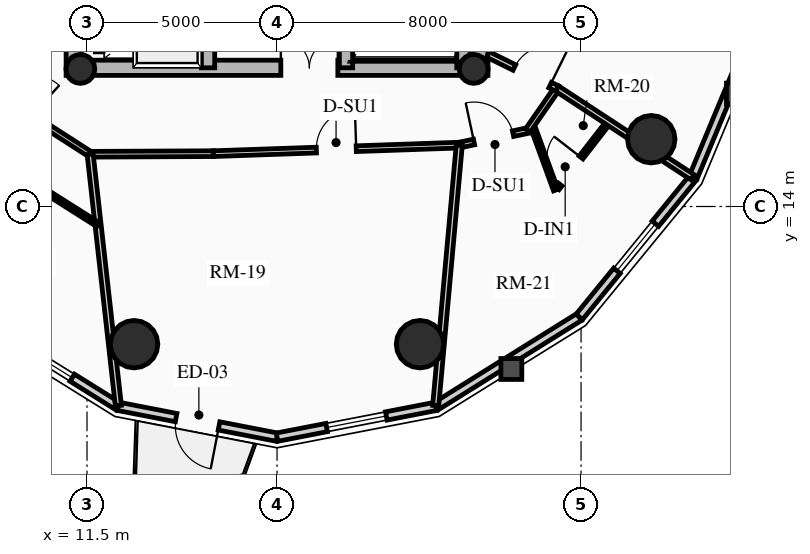
"""IFC4 building model, lengths in metres.
Left out: names, types, materials, properties, quantities, classifications, styles, units other than length and angle.
Written with IfcOpenShell. Run it as: python <this file> out.ifc"""

import sys

from ifc_helpers import new_model, si_unit, direction, frame, frame_2d, origin, origin_2d, place, context, subcontext, project, spatial, rectangle, circle, hollow_circle, extrude, source, transform, mapped, element, fill, save


model = new_model("IFC4")
c1 = context("Model", 3, precision=1e-05, world=origin(), true_north=direction((0.0, 1.0)))
c2 = subcontext(c1, "Body", "Model", "MODEL_VIEW")
j1 = project(units=[si_unit("LENGTHUNIT", "METRE"), si_unit("PLANEANGLEUNIT", "RADIAN")], contexts=[c1])
p1 = place(None, origin())
s1 = spatial("IfcSite", under=j1, at=p1, CompositionType="ELEMENT")
p2 = place(p1, origin())
s2 = spatial("IfcBuilding", under=s1, at=p2, CompositionType="ELEMENT")
p3 = place(p2, frame((0.0, 0.0, 171.97)))
s3 = spatial("IfcBuildingStorey", under=s2, at=p3, CompositionType="ELEMENT", Elevation=171.97)
for number, where, z_axis, x_axis in (
    (1, (11.15, 17.45, 0.0), (0.0, 0.0, 1.0), (0.0, 1.0, 0.0)),
    (2, (21.85, 17.45, 0.0), (0.0, 0.0, 1.0), (0.0, 1.0, 0.0)),
):
    element("IfcWall", number, at=place(p3, frame(where, z_axis=z_axis, x_axis=x_axis)), inside=s3, PredefinedType="SHEAR", context=c2, shape_type="SweptSolid", body=[
        extrude(rectangle(XDim=14.1, YDim=0.4, at=frame_2d((7.05, 0.0))), origin(), (0.0, 0.0, 1.0), 2.91),
    ])
p4 = place(p3, frame((11.15, 17.65, 0.0), z_axis=(0.0, 0.0, 1.0), x_axis=(1.0, 0.0, 0.0)))
e3 = element("IfcWall", 3, at=p4, inside=s3, PredefinedType="SHEAR", context=c2, shape_type="SweptSolid", body=[
    extrude(rectangle(XDim=10.7, YDim=0.4, at=frame_2d((5.35, 0.0))), origin(), (0.0, 0.0, 1.0), 2.91),
])
m1 = source(origin(), c2, "Body", "SweptSolid", [
    extrude(rectangle(XDim=1.5, YDim=2.02, at=frame_2d((0.75, 1.01))), frame((0.0, 0.21, 0.0), z_axis=(0.0, -1.0, 0.0), x_axis=(1.0, 0.0, 0.0)), (0.0, 0.0, 1.0), 0.42),
])
p5 = place(p4, frame((5.45, 0.0, 0.0)))
e4 = element("IfcOpeningElement", 4, at=p5, cuts=e3, PredefinedType="OPENING", context=c2, shape_type="MappedRepresentation", body=[
    mapped(m1, transform((0.0, 0.0, 0.0), x_axis=(1.0, 0.0, 0.0), y_axis=(0.0, 1.0, 0.0), z_axis=(0.0, 0.0, 1.0), scale=1.0)),
])
p6 = place(p3, frame((14.685, 17.65, 0.0), z_axis=(0.0, 0.0, 1.0), x_axis=(0.0, 1.0, 0.0)))
e5 = element("IfcWall", 5, at=p6, inside=s3, PredefinedType="SHEAR", context=c2, shape_type="SweptSolid", body=[
    extrude(rectangle(XDim=13.7, YDim=0.35, at=frame_2d((6.85, 0.0))), origin(), (0.0, 0.0, 1.0), 2.91),
])
m2 = source(origin(), c2, "Body", "SweptSolid", [
    extrude(rectangle(XDim=1.1, YDim=2.015, at=frame_2d((0.55, 1.007))), frame((0.0, 0.185, 0.0), z_axis=(0.0, -1.0, 0.0), x_axis=(1.0, 0.0, 0.0)), (0.0, 0.0, 1.0), 0.37),
])
p7 = place(p6, frame((4.85, 0.0, 0.0)))
e6 = element("IfcOpeningElement", 6, at=p7, cuts=e5, PredefinedType="OPENING", context=c2, shape_type="MappedRepresentation", body=[
    mapped(m2, transform((0.0, 0.0, 0.0), x_axis=(1.0, 0.0, 0.0), y_axis=(0.0, 1.0, 0.0), z_axis=(0.0, 0.0, 1.0), scale=1.0)),
])
p8 = place(p6, frame((0.625, 0.0, 0.0)))
e7 = element("IfcOpeningElement", 7, at=p8, cuts=e5, PredefinedType="OPENING", context=c2, shape_type="MappedRepresentation", body=[
    mapped(m2, transform((0.0, 0.0, 0.0), x_axis=(1.0, 0.0, 0.0), y_axis=(0.0, 1.0, 0.0), z_axis=(0.0, 0.0, 1.0), scale=1.0)),
])
p9 = place(p6, frame((2.625, 0.0, 0.0)))
e8 = element("IfcOpeningElement", 8, at=p9, cuts=e5, PredefinedType="OPENING", context=c2, shape_type="MappedRepresentation", body=[
    mapped(m2, transform((0.0, 0.0, 0.0), x_axis=(1.0, 0.0, 0.0), y_axis=(0.0, 1.0, 0.0), z_axis=(0.0, 0.0, 1.0), scale=1.0)),
])
m3 = source(origin(), c2, "Body", "SweptSolid", [
    extrude(rectangle(XDim=1.15, YDim=2.02, at=frame_2d((0.575, 1.01))), frame((0.0, 0.185, 0.0), z_axis=(0.0, -1.0, 0.0), x_axis=(1.0, 0.0, 0.0)), (0.0, 0.0, 1.0), 0.37),
])
p10 = place(p6, frame((7.27, 0.0, 0.0)))
e9 = element("IfcOpeningElement", 9, at=p10, cuts=e5, PredefinedType="OPENING", context=c2, shape_type="MappedRepresentation", body=[
    mapped(m3, transform((0.0, 0.0, 0.0), x_axis=(1.0, 0.0, 0.0), y_axis=(0.0, 1.0, 0.0), z_axis=(0.0, 0.0, 1.0), scale=1.0)),
])
p11 = place(p3, frame((18.315, 17.65, 0.0), z_axis=(0.0, 0.0, 1.0), x_axis=(0.0, 1.0, 0.0)))
e10 = element("IfcWall", 10, at=p11, inside=s3, PredefinedType="SHEAR", context=c2, shape_type="SweptSolid", body=[
    extrude(rectangle(XDim=9.6, YDim=0.35, at=frame_2d((4.8, 0.0))), origin(), (0.0, 0.0, 1.0), 2.91),
])
p12 = place(p11, frame((5.28, 0.0, 0.0)))
e11 = element("IfcOpeningElement", 11, at=p12, cuts=e10, PredefinedType="OPENING", context=c2, shape_type="MappedRepresentation", body=[
    mapped(m3, transform((0.0, 0.0, 0.0), x_axis=(1.0, 0.0, 0.0), y_axis=(0.0, 1.0, 0.0), z_axis=(0.0, 0.0, 1.0), scale=1.0)),
])
p13 = place(p3, frame((21.405, 17.65, 0.0), z_axis=(0.0, 0.0, 1.0), x_axis=(0.0, 1.0, 0.0)))
e12 = element("IfcWall", 12, at=p13, inside=s3, PredefinedType="SHEAR", context=c2, shape_type="SweptSolid", body=[
    extrude(rectangle(XDim=6.695, YDim=0.35, at=frame_2d((3.348, 0.0))), origin(), (0.0, 0.0, 1.0), 2.91),
])
for number, where, z_axis, x_axis in (
    (13, (11.325, 17.62, 0.0), (0.0, 0.0, 1.0), (1.0, 0.0, 0.0)),
    (14, (21.675, 17.62, 0.0), (0.0, 0.0, 1.0), (1.0, 0.0, 0.0)),
):
    element("IfcColumn", number, at=place(p3, frame(where, z_axis=z_axis, x_axis=x_axis)), inside=s3, PredefinedType="COLUMN", context=c2, shape_type="SweptSolid", body=[
        extrude(hollow_circle(Radius=0.38, WallThickness=0.032, at=origin_2d()), origin(), (0.0, 0.0, 1.0), 2.91),
    ])
for number, where, z_axis, x_axis in (
    (15, (12.739, 10.377, 0.0), (0.0, 0.0, 1.0), (1.0, 0.0, 0.0)),
    (16, (20.261, 10.377, 0.0), (0.0, 0.0, 1.0), (1.0, 0.0, 0.0)),
    (17, (26.347, 15.771, 0.0), (0.0, 0.0, 1.0), (1.0, 0.0, 0.0)),
):
    element("IfcColumn", number, at=place(p3, frame(where, z_axis=z_axis, x_axis=x_axis)), inside=s3, PredefinedType="USERDEFINED", context=c2, shape_type="SweptSolid", body=[
        extrude(circle(Radius=0.625, at=origin_2d()), origin(), (0.0, 0.0, 1.0), 2.91),
    ])
p14 = place(p3, frame((12.319, 8.741, 0.0), z_axis=(0.0, 0.0, 1.0), x_axis=(-0.848399108042, 0.529357113368, 0.0)))
e18 = element("IfcWall", 18, at=p14, inside=s3, PredefinedType="SOLIDWALL", context=c2, shape_type="SweptSolid", body=[
    extrude(rectangle(XDim=4.446, YDim=0.22, at=frame_2d((2.223, 0.0))), origin(), (0.0, 0.0, 1.0), 2.245),
])
m4 = source(origin(), c2, "Body", "SweptSolid", [
    extrude(rectangle(XDim=1.6, YDim=1.3, at=frame_2d((0.8, 0.65))), frame((0.0, 0.12, 0.0), z_axis=(0.0, -1.0, 0.0), x_axis=(1.0, 0.0, 0.0)), (0.0, 0.0, 1.0), 0.24),
])
p15 = place(p14, frame((1.423, 0.0, 0.65)))
e19 = element("IfcOpeningElement", 19, at=p15, cuts=e18, PredefinedType="OPENING", context=c2, shape_type="MappedRepresentation", body=[
    mapped(m4, transform((0.0, 0.0, 0.0), x_axis=(1.0, 0.0, 0.0), y_axis=(0.0, 1.0, 0.0), z_axis=(0.0, 0.0, 1.0), scale=1.0)),
])
p16 = place(p3, frame((16.5, 7.93, 0.0), z_axis=(0.0, 0.0, 1.0), x_axis=(-0.981703883443, 0.190413983815, 0.0)))
e20 = element("IfcWall", 20, at=p16, inside=s3, PredefinedType="SOLIDWALL", context=c2, shape_type="SweptSolid", body=[
    extrude(rectangle(XDim=4.259, YDim=0.22, at=frame_2d((2.13, 0.0))), origin(), (0.0, 0.0, 1.0), 2.245),
])
m5 = source(origin(), c2, "Body", "SweptSolid", [
    extrude(rectangle(XDim=1.15, YDim=2.005, at=frame_2d((0.575, 1.002))), frame((0.0, 0.12, 0.0), z_axis=(0.0, -1.0, 0.0), x_axis=(1.0, 0.0, 0.0)), (0.0, 0.0, 1.0), 0.24),
])
p17 = place(p16, frame((1.555, 0.0, 0.0)))
e21 = element("IfcOpeningElement", 21, at=p17, cuts=e20, PredefinedType="OPENING", context=c2, shape_type="MappedRepresentation", body=[
    mapped(m5, transform((0.0, 0.0, 0.0), x_axis=(1.0, 0.0, 0.0), y_axis=(0.0, 1.0, 0.0), z_axis=(0.0, 0.0, 1.0), scale=1.0)),
])
p18 = place(p3, frame((20.681, 8.741, 0.0), z_axis=(0.0, 0.0, 1.0), x_axis=(-0.981703883443, -0.190413983815, 0.0)))
e22 = element("IfcWall", 22, at=p18, inside=s3, PredefinedType="SOLIDWALL", context=c2, shape_type="SweptSolid", body=[
    extrude(rectangle(XDim=4.259, YDim=0.22, at=frame_2d((2.13, 0.0))), origin(), (0.0, 0.0, 1.0), 2.245),
])
p19 = place(p18, frame((1.33, 0.0, 0.65)))
e23 = element("IfcOpeningElement", 23, at=p19, cuts=e22, PredefinedType="OPENING", context=c2, shape_type="MappedRepresentation", body=[
    mapped(m4, transform((0.0, 0.0, 0.0), x_axis=(1.0, 0.0, 0.0), y_axis=(0.0, 1.0, 0.0), z_axis=(0.0, 0.0, 1.0), scale=1.0)),
])
p20 = place(p3, frame((24.453, 11.094, 0.0), z_axis=(0.0, 0.0, 1.0), x_axis=(-0.848399108042, -0.529357113368, 0.0)))
e24 = element("IfcWall", 24, at=p20, inside=s3, PredefinedType="SOLIDWALL", context=c2, shape_type="SweptSolid", body=[
    extrude(rectangle(XDim=4.446, YDim=0.22, at=frame_2d((2.223, 0.0))), origin(), (0.0, 0.0, 1.0), 2.245),
])
p21 = place(p3, frame((27.447, 14.76, 0.0), z_axis=(0.0, 0.0, 1.0), x_axis=(-0.632470615287, -0.774584353572, 0.0)))
e25 = element("IfcWall", 25, at=p21, inside=s3, PredefinedType="SOLIDWALL", context=c2, shape_type="SweptSolid", body=[
    extrude(rectangle(XDim=4.733, YDim=0.22, at=frame_2d((2.366, 0.0))), origin(), (0.0, 0.0, 1.0), 2.245),
])
p22 = place(p21, frame((1.566, 0.0, 0.65)))
e26 = element("IfcOpeningElement", 26, at=p22, cuts=e25, PredefinedType="OPENING", context=c2, shape_type="MappedRepresentation", body=[
    mapped(m4, transform((0.0, 0.0, 0.0), x_axis=(1.0, 0.0, 0.0), y_axis=(0.0, 1.0, 0.0), z_axis=(0.0, 0.0, 1.0), scale=1.0)),
])
p23 = place(p3, frame((29.369, 19.38, 0.0), z_axis=(0.0, 0.0, 1.0), x_axis=(-0.384144094086, -0.923273152961, 0.0)))
e27 = element("IfcWall", 27, at=p23, inside=s3, PredefinedType="SOLIDWALL", context=c2, shape_type="SweptSolid", body=[
    extrude(rectangle(XDim=5.003, YDim=0.22, at=frame_2d((2.501, 0.0))), origin(), (0.0, 0.0, 1.0), 2.245),
])
p24 = place(p3, frame((10.277, 16.214, 0.0), z_axis=(0.0, 0.0, 1.0), x_axis=(0.841060909507, -0.540940427865, 0.0)))
e28 = element("IfcWall", 28, at=p24, inside=s3, PredefinedType="PARTITIONING", context=c2, shape_type="SweptSolid", body=[
    extrude(rectangle(XDim=1.552, YDim=0.15, at=frame_2d((0.776, 0.0))), origin(), (0.0, 0.0, 1.0), 2.245),
])
p25 = place(p3, frame((11.583, 15.375, 0.0), z_axis=(0.0, 0.0, 1.0), x_axis=(0.999988014548, 0.004895994347, 0.0)))
e29 = element("IfcWall", 29, at=p25, inside=s3, PredefinedType="PARTITIONING", context=c2, shape_type="SweptSolid", body=[
    extrude(rectangle(XDim=3.241, YDim=0.15, at=frame_2d((1.621, 0.0))), origin(), (0.0, 0.0, 1.0), 2.245),
])
p26 = place(p3, frame((14.824, 15.391, 0.0), z_axis=(0.0, 0.0, 1.0), x_axis=(0.999399579064, 0.034647963376, 0.0)))
e30 = element("IfcWall", 30, at=p26, inside=s3, PredefinedType="PARTITIONING", context=c2, shape_type="SweptSolid", body=[
    extrude(rectangle(XDim=6.476, YDim=0.15, at=frame_2d((3.238, 0.0))), origin(), (0.0, 0.0, 1.0), 2.245),
])
m6 = source(origin(), c2, "Body", "SweptSolid", [
    extrude(rectangle(XDim=1.05, YDim=2.015, at=frame_2d((0.525, 1.007))), frame((0.0, 0.085, 0.0), z_axis=(0.0, -1.0, 0.0), x_axis=(1.0, 0.0, 0.0)), (0.0, 0.0, 1.0), 0.17),
])
p27 = place(p26, frame((2.713, 0.0, 0.0)))
e31 = element("IfcOpeningElement", 31, at=p27, cuts=e30, PredefinedType="OPENING", context=c2, shape_type="MappedRepresentation", body=[
    mapped(m6, transform((0.0, 0.0, 0.0), x_axis=(1.0, 0.0, 0.0), y_axis=(0.0, 1.0, 0.0), z_axis=(0.0, 0.0, 1.0), scale=1.0)),
])
p28 = place(p3, frame((21.295, 15.615, 0.0), z_axis=(0.0, 0.0, 1.0), x_axis=(0.978043957244, 0.20839869889, 0.0)))
e32 = element("IfcWall", 32, at=p28, inside=s3, PredefinedType="PARTITIONING", context=c2, shape_type="SweptSolid", body=[
    extrude(rectangle(XDim=1.844, YDim=0.15, at=frame_2d((0.922, 0.0))), origin(), (0.0, 0.0, 1.0), 2.245),
])
p29 = place(p28, frame((0.397, 0.0, 0.0)))
e33 = element("IfcOpeningElement", 33, at=p29, cuts=e32, PredefinedType="OPENING", context=c2, shape_type="MappedRepresentation", body=[
    mapped(m6, transform((0.0, 0.0, 0.0), x_axis=(1.0, 0.0, 0.0), y_axis=(0.0, 1.0, 0.0), z_axis=(0.0, 0.0, 1.0), scale=1.0)),
])
p30 = place(p3, frame((23.099, 15.999, 0.0), z_axis=(0.0, 0.0, 1.0), x_axis=(0.570001625459, 0.821643564433, 0.0)))
e34 = element("IfcWall", 34, at=p30, inside=s3, PredefinedType="PARTITIONING", context=c2, shape_type="SweptSolid", body=[
    extrude(rectangle(XDim=1.347, YDim=0.15, at=frame_2d((0.673, 0.0))), origin(), (0.0, 0.0, 1.0), 2.245),
])
p31 = place(p3, frame((11.583, 15.375, 0.0), z_axis=(0.0, 0.0, 1.0), x_axis=(0.111538514066, -0.993760111838, 0.0)))
e35 = element("IfcWall", 35, at=p31, inside=s3, PredefinedType="PARTITIONING", context=c2, shape_type="SweptSolid", body=[
    extrude(rectangle(XDim=6.656, YDim=0.16, at=frame_2d((3.328, 0.0))), origin(), (0.0, 0.0, 1.0), 2.245),
])
p32 = place(p3, frame((21.295, 15.615, 0.0), z_axis=(0.0, 0.0, 1.0), x_axis=(-0.090129576558, -0.995930047458, 0.0)))
e36 = element("IfcWall", 36, at=p32, inside=s3, PredefinedType="PARTITIONING", context=c2, shape_type="SweptSolid", body=[
    extrude(rectangle(XDim=6.883, YDim=0.16, at=frame_2d((3.441, 0.0))), origin(), (0.0, 0.0, 1.0), 2.245),
])
p33 = place(p3, frame((23.866, 17.106, 0.0), z_axis=(0.0, 0.0, 1.0), x_axis=(0.836641352238, -0.547751081902, 0.0)))
e37 = element("IfcWall", 37, at=p33, inside=s3, PredefinedType="PARTITIONING", context=c2, shape_type="SweptSolid", body=[
    extrude(rectangle(XDim=4.26, YDim=0.16, at=frame_2d((2.13, 0.0))), origin(), (0.0, 0.0, 1.0), 2.245),
])
p34 = place(p3, frame((22.05, 18.0, 0.0), z_axis=(0.0, 0.0, 1.0), x_axis=(0.897159648657, -0.441706423795, 0.0)))
e38 = element("IfcWall", 38, at=p34, inside=s3, PredefinedType="PARTITIONING", context=c2, shape_type="SweptSolid", body=[
    extrude(rectangle(XDim=2.025, YDim=0.16, at=frame_2d((1.012, 0.0))), origin(), (0.0, 0.0, 1.0), 2.245),
])
m7 = source(origin(), c2, "Body", "SweptSolid", [
    extrude(rectangle(XDim=1.05, YDim=2.015, at=frame_2d((0.525, 1.007))), frame((0.0, 0.09, 0.0), z_axis=(0.0, -1.0, 0.0), x_axis=(1.0, 0.0, 0.0)), (0.0, 0.0, 1.0), 0.18),
])
p35 = place(p34, frame((0.775, 0.0, 0.0)))
e39 = element("IfcOpeningElement", 39, at=p35, cuts=e38, PredefinedType="OPENING", context=c2, shape_type="MappedRepresentation", body=[
    mapped(m7, transform((0.0, 0.0, 0.0), x_axis=(1.0, 0.0, 0.0), y_axis=(0.0, 1.0, 0.0), z_axis=(0.0, 0.0, 1.0), scale=1.0)),
])
p36 = place(p3, frame((9.796, 14.785, 0.0), z_axis=(0.0, 0.0, 1.0), x_axis=(0.844898543763, -0.534926584446, 0.0)))
e40 = element("IfcWall", 40, at=p36, inside=s3, PredefinedType="PARTITIONING", context=c2, shape_type="SweptSolid", body=[
    extrude(rectangle(XDim=2.361, YDim=0.125, at=frame_2d((1.18, 0.0))), origin(), (0.0, 0.0, 1.0), 2.245),
])
p37 = place(p3, frame((23.256, 16.018, 0.0), z_axis=(0.0, 0.0, 1.0), x_axis=(0.342788033774, -0.939412776101, 0.0)))
e41 = element("IfcWall", 41, at=p37, inside=s3, PredefinedType="PARTITIONING", context=c2, shape_type="SweptSolid", body=[
    extrude(rectangle(XDim=1.688, YDim=0.125, at=frame_2d((0.844, 0.0))), origin(), (0.0, 0.0, 1.0), 2.675),
])
p38 = place(p3, frame((23.875, 14.484, 0.0), z_axis=(0.0, 0.0, 1.0), x_axis=(0.61297586552, 0.790101631621, 0.0)))
e42 = element("IfcWall", 42, at=p38, inside=s3, PredefinedType="PARTITIONING", context=c2, shape_type="SweptSolid", body=[
    extrude(rectangle(XDim=2.103, YDim=0.125, at=frame_2d((1.052, 0.0))), origin(), (0.0, 0.0, 1.0), 2.245),
])
m8 = source(origin(), c2, "Body", "SweptSolid", [
    extrude(rectangle(XDim=0.9, YDim=2.005, at=frame_2d((0.45, 1.002))), frame((0.0, 0.073, 0.0), z_axis=(0.0, -1.0, 0.0), x_axis=(1.0, 0.0, 0.0)), (0.0, 0.0, 1.0), 0.145),
])
p39 = place(p38, frame((0.12, 0.0, 0.0)))
e43 = element("IfcOpeningElement", 43, at=p39, cuts=e42, PredefinedType="OPENING", context=c2, shape_type="MappedRepresentation", body=[
    mapped(m8, transform((0.0, 0.0, 0.0), x_axis=(1.0, 0.0, 0.0), y_axis=(0.0, 1.0, 0.0), z_axis=(0.0, 0.0, 1.0), scale=1.0)),
])
m9 = source(origin(), c2, "Body", "SweptSolid", [
    extrude(rectangle(XDim=1.6, YDim=1.3, at=frame_2d((0.8, 0.65))), frame((0.0, 0.03, 0.0), z_axis=(0.0, -1.0, 0.0), x_axis=(1.0, 0.0, 0.0)), (0.0, 0.0, 1.0), 0.06),
])
p40 = place(p15, origin())
e44 = element("IfcWindow", 44, at=p40, inside=s3, PartitioningType="SINGLE_PANEL", PredefinedType="WINDOW", context=c2, shape_type="MappedRepresentation", body=[
    mapped(m9, transform((0.0, 0.0, 0.0), x_axis=(1.0, 0.0, 0.0), y_axis=(0.0, 1.0, 0.0), z_axis=(0.0, 0.0, 1.0), scale=1.0)),
])
fill(e19, e44)
m10 = source(origin(), c2, "Body", "SweptSolid", [
    extrude(rectangle(XDim=1.15, YDim=2.005, at=frame_2d((0.575, 1.002))), frame((0.0, 0.025, 0.0), z_axis=(0.0, -1.0, 0.0), x_axis=(1.0, 0.0, 0.0)), (0.0, 0.0, 1.0), 0.05),
])
p41 = place(p17, origin())
e45 = element("IfcDoor", 45, at=p41, inside=s3, OperationType="SINGLE_SWING_LEFT", PredefinedType="DOOR", context=c2, shape_type="MappedRepresentation", body=[
    mapped(m10, transform((0.0, 0.0, 0.0), x_axis=(1.0, 0.0, 0.0), y_axis=(0.0, 1.0, 0.0), z_axis=(0.0, 0.0, 1.0), scale=1.0)),
])
fill(e21, e45)
p42 = place(p19, origin())
e46 = element("IfcWindow", 46, at=p42, inside=s3, PartitioningType="SINGLE_PANEL", PredefinedType="WINDOW", context=c2, shape_type="MappedRepresentation", body=[
    mapped(m9, transform((0.0, 0.0, 0.0), x_axis=(1.0, 0.0, 0.0), y_axis=(0.0, 1.0, 0.0), z_axis=(0.0, 0.0, 1.0), scale=1.0)),
])
fill(e23, e46)
p43 = place(p22, origin())
e47 = element("IfcWindow", 47, at=p43, inside=s3, PartitioningType="SINGLE_PANEL", PredefinedType="WINDOW", context=c2, shape_type="MappedRepresentation", body=[
    mapped(m9, transform((0.0, 0.0, 0.0), x_axis=(1.0, 0.0, 0.0), y_axis=(0.0, 1.0, 0.0), z_axis=(0.0, 0.0, 1.0), scale=1.0)),
])
fill(e26, e47)
m11 = source(origin(), c2, "Body", "SweptSolid", [
    extrude(rectangle(XDim=1.5, YDim=2.02, at=frame_2d((0.75, 1.01))), frame((0.0, 0.025, 0.0), z_axis=(0.0, -1.0, 0.0), x_axis=(1.0, 0.0, 0.0)), (0.0, 0.0, 1.0), 0.05),
])
p44 = place(p5, origin())
e48 = element("IfcDoor", 48, at=p44, inside=s3, OperationType="DOUBLE_DOOR_SINGLE_SWING", PredefinedType="DOOR", context=c2, shape_type="MappedRepresentation", body=[
    mapped(m11, transform((0.0, 0.0, 0.0), x_axis=(1.0, 0.0, 0.0), y_axis=(0.0, 1.0, 0.0), z_axis=(0.0, 0.0, 1.0), scale=1.0)),
])
fill(e4, e48)
m12 = source(origin(), c2, "Body", "SweptSolid", [
    extrude(rectangle(XDim=1.05, YDim=2.015, at=frame_2d((0.525, 1.007))), frame((0.0, 0.025, 0.0), z_axis=(0.0, -1.0, 0.0), x_axis=(1.0, 0.0, 0.0)), (0.0, 0.0, 1.0), 0.05),
])
p45 = place(p35, origin())
e49 = element("IfcDoor", 49, at=p45, inside=s3, OperationType="SINGLE_SWING_RIGHT", PredefinedType="DOOR", context=c2, shape_type="MappedRepresentation", body=[
    mapped(m12, transform((0.0, 0.0, 0.0), x_axis=(1.0, 0.0, 0.0), y_axis=(0.0, 1.0, 0.0), z_axis=(0.0, 0.0, 1.0), scale=1.0)),
])
fill(e39, e49)
p46 = place(p27, origin())
e50 = element("IfcDoor", 50, at=p46, inside=s3, OperationType="SINGLE_SWING_RIGHT", PredefinedType="DOOR", context=c2, shape_type="MappedRepresentation", body=[
    mapped(m12, transform((0.0, 0.0, 0.0), x_axis=(1.0, 0.0, 0.0), y_axis=(0.0, 1.0, 0.0), z_axis=(0.0, 0.0, 1.0), scale=1.0)),
])
fill(e31, e50)
p47 = place(p29, origin())
e51 = element("IfcDoor", 51, at=p47, inside=s3, OperationType="SINGLE_SWING_LEFT", PredefinedType="DOOR", context=c2, shape_type="MappedRepresentation", body=[
    mapped(m12, transform((0.0, 0.0, 0.0), x_axis=(1.0, 0.0, 0.0), y_axis=(0.0, 1.0, 0.0), z_axis=(0.0, 0.0, 1.0), scale=1.0)),
])
fill(e33, e51)
m13 = source(origin(), c2, "Body", "SweptSolid", [
    extrude(rectangle(XDim=0.9, YDim=2.005, at=frame_2d((0.45, 1.002))), frame((0.0, 0.025, 0.0), z_axis=(0.0, -1.0, 0.0), x_axis=(1.0, 0.0, 0.0)), (0.0, 0.0, 1.0), 0.05),
])
p48 = place(p39, origin())
e52 = element("IfcDoor", 52, at=p48, inside=s3, OperationType="SINGLE_SWING_RIGHT", PredefinedType="DOOR", context=c2, shape_type="MappedRepresentation", body=[
    mapped(m13, transform((0.0, 0.0, 0.0), x_axis=(1.0, 0.0, 0.0), y_axis=(0.0, 1.0, 0.0), z_axis=(0.0, 0.0, 1.0), scale=1.0)),
])
fill(e43, e52)
save(model, sys.argv[1])
